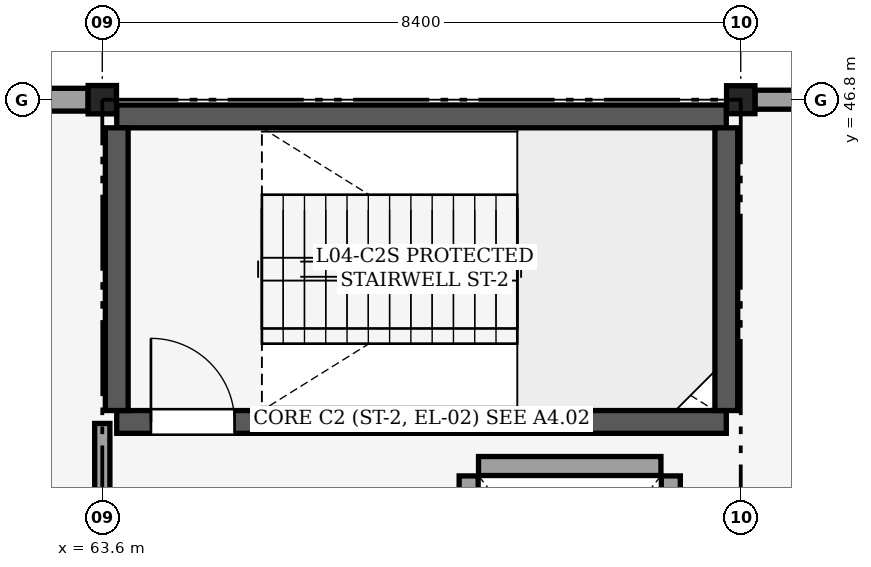
"""IFC4 building model, lengths in metres.
Left out: names, types, materials, properties, quantities, classifications, styles, units other than length and angle.
Written with IfcOpenShell. Run it as: python <this file> out.ifc"""

import sys

from ifc_helpers import new_model, si_unit, direction, frame, frame_2d, origin, origin_2d, place, context, subcontext, project, spatial, rectangle, i_section, extrude, element, fill, save


model = new_model("IFC4")
c1 = context("Model", 3, precision=1e-05, world=origin(), true_north=direction((0.0, 1.0)))
c2 = subcontext(c1, "Body", "Model", "MODEL_VIEW")
j1 = project(units=[si_unit("LENGTHUNIT", "METRE"), si_unit("PLANEANGLEUNIT", "RADIAN")], contexts=[c1])
p1 = place(None, origin())
s1 = spatial("IfcSite", under=j1, at=p1, CompositionType="ELEMENT")
p2 = place(p1, origin())
s2 = spatial("IfcBuilding", under=s1, at=p2, CompositionType="ELEMENT")
p3 = place(p2, frame((0.0, 0.0, 19.8)))
s3 = spatial("IfcBuildingStorey", under=s2, at=p3, CompositionType="ELEMENT", Elevation=19.8)
p4 = place(p3, frame((63.6, 46.8, 0.0), z_axis=(0.0, 0.0, 1.0), x_axis=(1.0, 0.0, 0.0)))
e1 = element("IfcColumn", 1, at=p4, inside=s3, PredefinedType="COLUMN", context=c2, shape_type="SweptSolid", body=[
    extrude(i_section(OverallWidth=0.373, OverallDepth=0.373, WebThickness=0.016, FlangeThickness=0.026, FilletRadius=0.025, at=origin_2d()), origin(), (0.0, 0.0, 1.0), 4.8),
])
p5 = place(p3, frame((72.0, 46.8, 0.0), z_axis=(0.0, 0.0, 1.0), x_axis=(1.0, 0.0, 0.0)))
e2 = element("IfcColumn", 2, at=p5, inside=s3, PredefinedType="COLUMN", context=c2, shape_type="SweptSolid", body=[
    extrude(i_section(OverallWidth=0.373, OverallDepth=0.368, WebThickness=0.015, FlangeThickness=0.024, FilletRadius=0.025, at=origin_2d()), origin(), (0.0, 0.0, 1.0), 4.8),
])
p6 = place(p3, frame((55.384, 46.8, 0.0), z_axis=(0.0, 0.0, 1.0), x_axis=(1.0, 0.0, 0.0)))
e3 = element("IfcWall", 3, at=p6, inside=s3, PredefinedType="SOLIDWALL", context=c2, shape_type="SweptSolid", body=[
    extrude(rectangle(XDim=8.03, YDim=0.3, at=frame_2d((4.015, 0.0))), origin(), (0.0, 0.0, 1.0), 3.798),
])
p7 = place(p6, frame((2.515, 0.0, 0.85)))
e4 = element("IfcOpeningElement", 4, at=p7, cuts=e3, PredefinedType="OPENING", context=c2, shape_type="SweptSolid", body=[
    extrude(rectangle(XDim=3.0, YDim=1.9, at=frame_2d((1.5, 0.95))), frame((0.0, 0.16, 0.0), z_axis=(0.0, -1.0, 0.0), x_axis=(1.0, 0.0, 0.0)), (0.0, 0.0, 1.0), 0.321),
])
p8 = place(p3, frame((72.187, 46.8, 0.0), z_axis=(0.0, 0.0, 1.0), x_axis=(1.0, 0.0, 0.0)))
e5 = element("IfcWall", 5, at=p8, inside=s3, PredefinedType="SOLIDWALL", context=c2, shape_type="SweptSolid", body=[
    extrude(rectangle(XDim=8.028, YDim=0.25, at=frame_2d((4.014, 0.0))), origin(), (0.0, 0.0, 1.0), 4.255),
])
p9 = place(p8, frame((3.414, 0.0, 0.9)))
e6 = element("IfcOpeningElement", 6, at=p9, cuts=e5, PredefinedType="OPENING", context=c2, shape_type="SweptSolid", body=[
    extrude(rectangle(XDim=1.2, YDim=1.5, at=frame_2d((0.6, 0.75))), frame((0.0, 0.135, 0.0), z_axis=(0.0, -1.0, 0.0), x_axis=(1.0, 0.0, 0.0)), (0.0, 0.0, 1.0), 0.271),
])
p10 = place(p3, frame((63.79, 42.56, 0.0), z_axis=(0.0, 0.0, 1.0), x_axis=(1.0, 0.0, 0.0)))
e7 = element("IfcWall", 7, at=p10, inside=s3, PredefinedType="SHEAR", context=c2, shape_type="SweptSolid", body=[
    extrude(rectangle(XDim=8.02, YDim=0.3, at=frame_2d((4.01, 0.0))), origin(), (0.0, 0.0, 1.0), 4.58),
])
p11 = place(p10, frame((0.45, 0.0, 0.0)))
e8 = element("IfcOpeningElement", 8, at=p11, cuts=e7, PredefinedType="OPENING", context=c2, shape_type="SweptSolid", body=[
    extrude(rectangle(XDim=1.1, YDim=2.15, at=frame_2d((0.55, 1.075))), frame((0.0, 0.16, 0.0), z_axis=(0.0, -1.0, 0.0), x_axis=(1.0, 0.0, 0.0)), (0.0, 0.0, 1.0), 0.321),
])
p12 = place(p3, frame((63.79, 46.58, 0.0), z_axis=(0.0, 0.0, 1.0), x_axis=(1.0, 0.0, 0.0)))
e9 = element("IfcWall", 9, at=p12, inside=s3, PredefinedType="SHEAR", context=c2, shape_type="SweptSolid", body=[
    extrude(rectangle(XDim=8.02, YDim=0.3, at=frame_2d((4.01, 0.0))), origin(), (0.0, 0.0, 1.0), 4.58),
])
for number, where, z_axis, x_axis in (
    (10, (63.79, 42.71, 0.0), (0.0, 0.0, 1.0), (0.0, 1.0, 0.0)),
    (11, (71.81, 42.71, 0.0), (0.0, 0.0, 1.0), (0.0, 1.0, 0.0)),
):
    element("IfcWall", number, at=place(p3, frame(where, z_axis=z_axis, x_axis=x_axis)), inside=s3, PredefinedType="SHEAR", context=c2, shape_type="SweptSolid", body=[
        extrude(rectangle(XDim=3.72, YDim=0.3, at=frame_2d((1.86, 0.0))), origin(), (0.0, 0.0, 1.0), 4.58),
    ])
p13 = place(p3, frame((71.08, 38.85, 0.0), z_axis=(0.0, 0.0, 1.0), x_axis=(0.0, 1.0, 0.0)))
e12 = element("IfcWall", 12, at=p13, inside=s3, PredefinedType="PARTITIONING", context=c2, shape_type="SweptSolid", body=[
    extrude(rectangle(XDim=3.0, YDim=0.25, at=frame_2d((1.5, 0.0))), origin(), (0.0, 0.0, 1.0), 4.58),
])
p14 = place(p3, frame((68.55, 41.98, 0.0), z_axis=(0.0, 0.0, 1.0), x_axis=(1.0, 0.0, 0.0)))
e13 = element("IfcWall", 13, at=p14, inside=s3, PredefinedType="PARTITIONING", context=c2, shape_type="SweptSolid", body=[
    extrude(rectangle(XDim=2.4, YDim=0.25, at=frame_2d((1.2, 0.0))), origin(), (0.0, 0.0, 1.0), 4.58),
])
p15 = place(p3, frame((68.42, 38.5, 0.0), z_axis=(0.0, 0.0, 1.0), x_axis=(0.0, 1.0, 0.0)))
e14 = element("IfcWall", 14, at=p15, inside=s3, PredefinedType="PARTITIONING", context=c2, shape_type="SweptSolid", body=[
    extrude(rectangle(XDim=3.35, YDim=0.25, at=frame_2d((1.675, 0.0))), origin(), (0.0, 0.0, 1.0), 4.58),
])
p16 = place(p15, frame((0.85, 0.0, 0.0)))
e15 = element("IfcOpeningElement", 15, at=p16, cuts=e14, PredefinedType="OPENING", context=c2, shape_type="SweptSolid", body=[
    extrude(rectangle(XDim=1.25, YDim=2.15, at=frame_2d((0.625, 1.075))), frame((0.0, 0.135, 0.0), z_axis=(0.0, -1.0, 0.0), x_axis=(1.0, 0.0, 0.0)), (0.0, 0.0, 1.0), 0.271),
])
p17 = place(p3, frame((63.6, 38.62, 0.0), z_axis=(0.0, 0.0, 1.0), x_axis=(0.0, 1.0, 0.0)))
e16 = element("IfcWall", 16, at=p17, inside=s3, PredefinedType="PARTITIONING", context=c2, shape_type="SweptSolid", body=[
    extrude(rectangle(XDim=3.92, YDim=0.2, at=frame_2d((1.96, 0.0))), origin(), (0.0, 0.0, 1.0), 3.867),
])
p18 = place(p11, origin())
e17 = element("IfcDoor", 17, at=p18, inside=s3, OperationType="SINGLE_SWING_LEFT", PredefinedType="DOOR", context=c2, shape_type="SweptSolid", body=[
    extrude(rectangle(XDim=1.1, YDim=2.15, at=frame_2d((0.55, 1.075))), frame((0.0, 0.025, 0.0), z_axis=(0.0, -1.0, 0.0), x_axis=(1.0, 0.0, 0.0)), (0.0, 0.0, 1.0), 0.05),
])
fill(e8, e17)
save(model, sys.argv[1])
